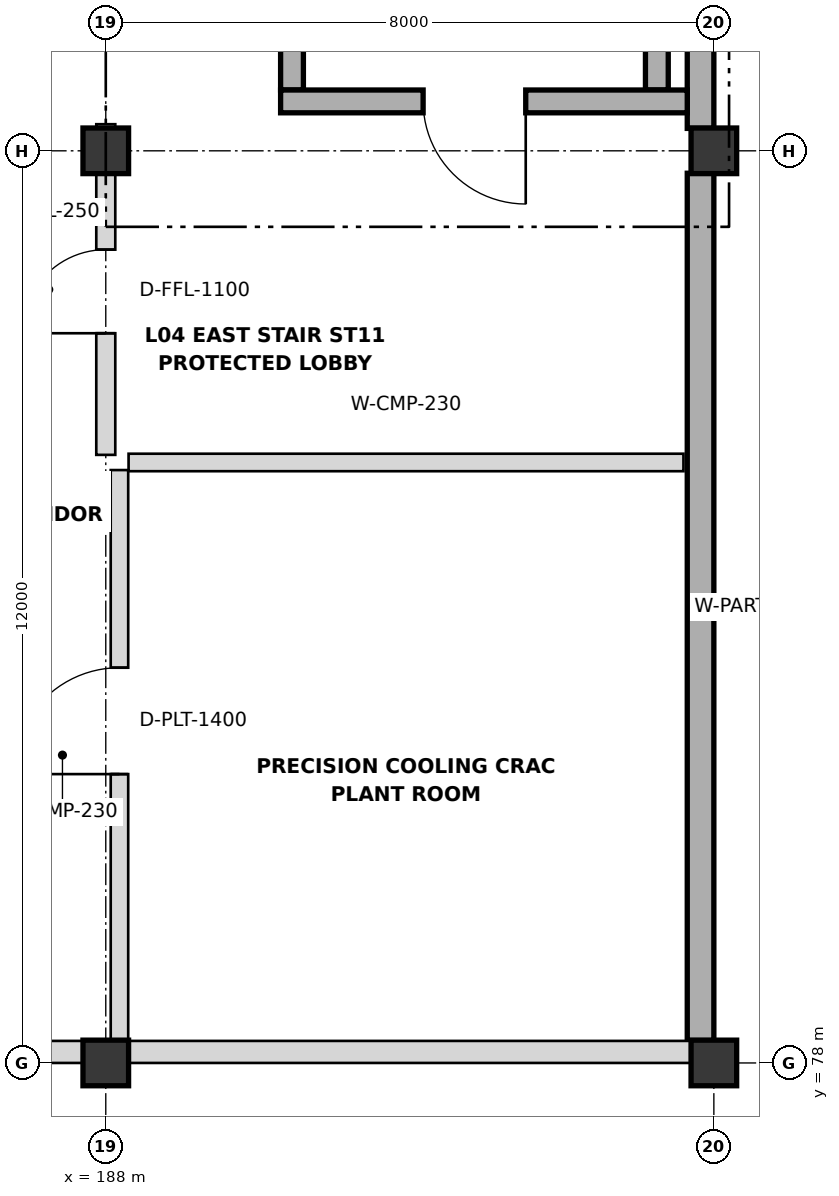
"""IFC4 building model, lengths in metres.
Left out: names, types, materials, properties, quantities, classifications, styles, units other than length and angle.
Written with IfcOpenShell. Run it as: python <this file> out.ifc"""

import sys

from ifc_helpers import new_model, si_unit, direction, frame, frame_2d, origin, origin_2d, place, context, subcontext, project, spatial, rectangle, extrude, element, fill, save


model = new_model("IFC4")
c1 = context("Model", 3, precision=1e-05, world=origin(), true_north=direction((0.0, 1.0)))
c2 = subcontext(c1, "Body", "Model", "MODEL_VIEW")
j1 = project(units=[si_unit("LENGTHUNIT", "METRE"), si_unit("PLANEANGLEUNIT", "RADIAN")], contexts=[c1])
p1 = place(None, origin())
s1 = spatial("IfcSite", under=j1, at=p1, CompositionType="ELEMENT")
p2 = place(p1, origin())
s2 = spatial("IfcBuilding", under=s1, at=p2, CompositionType="ELEMENT")
p3 = place(p2, frame((0.0, 0.0, 18.6)))
s3 = spatial("IfcBuildingStorey", under=s2, at=p3, CompositionType="ELEMENT", Elevation=18.6)
for number, where, z_axis, x_axis in (
    (1, (188.0, 78.0, 0.0), (0.0, 0.0, 1.0), (1.0, 0.0, 0.0)),
    (2, (188.0, 90.0, 0.0), (0.0, 0.0, 1.0), (1.0, 0.0, 0.0)),
    (3, (196.0, 78.0, 0.0), (0.0, 0.0, 1.0), (1.0, 0.0, 0.0)),
    (4, (196.0, 90.0, 0.0), (0.0, 0.0, 1.0), (1.0, 0.0, 0.0)),
):
    element("IfcColumn", number, at=place(p3, frame(where, z_axis=z_axis, x_axis=x_axis)), inside=s3, PredefinedType="COLUMN", context=c2, shape_type="SweptSolid", body=[
        extrude(rectangle(XDim=0.6, YDim=0.6, at=origin_2d()), origin(), (0.0, 0.0, 1.0), 4.2),
    ])
for number, where, z_axis, x_axis in (
    (5, (195.825, 89.705, 0.0), (0.0, 0.0, 1.0), (0.0, -1.0, 0.0)),
    (6, (195.825, 101.705, 0.0), (0.0, 0.0, 1.0), (0.0, -1.0, 0.0)),
):
    element("IfcWall", number, at=place(p3, frame(where, z_axis=z_axis, x_axis=x_axis)), inside=s3, PredefinedType="SOLIDWALL", context=c2, shape_type="SweptSolid", body=[
        extrude(rectangle(XDim=11.41, YDim=0.35, at=frame_2d((5.705, 0.0))), origin(), (0.0, 0.0, 1.0), 4.2),
    ])
p4 = place(p3, frame((187.705, 78.145, 0.0), z_axis=(0.0, 0.0, 1.0), x_axis=(-1.0, 0.0, 0.0)))
e7 = element("IfcWall", 7, at=p4, inside=s3, PredefinedType="SOLIDWALL", context=c2, shape_type="SweptSolid", body=[
    extrude(rectangle(XDim=9.41, YDim=0.29, at=frame_2d((4.705, 0.0))), origin(), (0.0, 0.0, 1.0), 3.188),
])
p5 = place(p4, frame((5.405, 0.0, 1.0)))
e8 = element("IfcOpeningElement", 8, at=p5, cuts=e7, PredefinedType="OPENING", context=c2, shape_type="SweptSolid", body=[
    extrude(rectangle(XDim=2.1, YDim=1.15, at=frame_2d((1.05, 0.575))), frame((0.0, 0.155, 0.0), z_axis=(0.0, -1.0, 0.0), x_axis=(1.0, 0.0, 0.0)), (0.0, 0.0, 1.0), 0.31),
])
p6 = place(p3, frame((195.705, 78.145, 0.0), z_axis=(0.0, 0.0, 1.0), x_axis=(-1.0, 0.0, 0.0)))
e9 = element("IfcWall", 9, at=p6, inside=s3, PredefinedType="SOLIDWALL", context=c2, shape_type="SweptSolid", body=[
    extrude(rectangle(XDim=7.41, YDim=0.29, at=frame_2d((3.705, 0.0))), origin(), (0.0, 0.0, 1.0), 3.188),
])
for number, where, z_axis, x_axis in (
    (10, (190.45, 90.8, 0.0), (0.0, 0.0, 1.0), (0.0, 1.0, 0.0)),
    (11, (195.25, 99.4, 0.0), (0.0, 0.0, 1.0), (0.0, -1.0, 0.0)),
):
    element("IfcWall", number, at=place(p3, frame(where, z_axis=z_axis, x_axis=x_axis)), inside=s3, PredefinedType="SHEAR", context=c2, shape_type="SweptSolid", body=[
        extrude(rectangle(XDim=8.6, YDim=0.3, at=frame_2d((4.3, 0.0))), origin(), (0.0, 0.0, 1.0), 4.2),
    ])
p7 = place(p3, frame((195.65, 90.65, 0.0), z_axis=(0.0, 0.0, 1.0), x_axis=(-1.0, 0.0, 0.0)))
e12 = element("IfcWall", 12, at=p7, inside=s3, PredefinedType="SHEAR", context=c2, shape_type="SweptSolid", body=[
    extrude(rectangle(XDim=5.35, YDim=0.3, at=frame_2d((2.675, 0.0))), origin(), (0.0, 0.0, 1.0), 4.2),
])
p8 = place(p7, frame((2.125, 0.0, 0.0)))
e13 = element("IfcOpeningElement", 13, at=p8, cuts=e12, PredefinedType="OPENING", context=c2, shape_type="SweptSolid", body=[
    extrude(rectangle(XDim=1.35, YDim=2.15, at=frame_2d((0.675, 1.075))), frame((0.0, 0.16, 0.0), z_axis=(0.0, -1.0, 0.0), x_axis=(1.0, 0.0, 0.0)), (0.0, 0.0, 1.0), 0.32),
])
p9 = place(p3, frame((188.0, 86.0, 0.0), z_axis=(0.0, 0.0, 1.0), x_axis=(0.0, 1.0, 0.0)))
e14 = element("IfcWall", 14, at=p9, inside=s3, PredefinedType="PARTITIONING", context=c2, shape_type="SweptSolid", body=[
    extrude(rectangle(XDim=4.35, YDim=0.25, at=frame_2d((2.175, 0.0))), origin(), (0.0, 0.0, 1.0), 3.188),
])
p10 = place(p9, frame((1.6, 0.0, 0.0)))
e15 = element("IfcOpeningElement", 15, at=p10, cuts=e14, PredefinedType="OPENING", context=c2, shape_type="SweptSolid", body=[
    extrude(rectangle(XDim=1.1, YDim=2.15, at=frame_2d((0.55, 1.075))), frame((0.0, 0.135, 0.0), z_axis=(0.0, -1.0, 0.0), x_axis=(1.0, 0.0, 0.0)), (0.0, 0.0, 1.0), 0.27),
])
p11 = place(p3, frame((188.18, 78.3, 0.0), z_axis=(0.0, 0.0, 1.0), x_axis=(0.0, 1.0, 0.0)))
e16 = element("IfcWall", 16, at=p11, inside=s3, PredefinedType="PARTITIONING", context=c2, shape_type="SweptSolid", body=[
    extrude(rectangle(XDim=7.5, YDim=0.23, at=frame_2d((3.75, 0.0))), origin(), (0.0, 0.0, 1.0), 3.188),
])
p12 = place(p11, frame((3.5, 0.0, 0.0)))
e17 = element("IfcOpeningElement", 17, at=p12, cuts=e16, PredefinedType="OPENING", context=c2, shape_type="SweptSolid", body=[
    extrude(rectangle(XDim=1.4, YDim=2.2, at=frame_2d((0.7, 1.1))), frame((0.0, 0.125, 0.0), z_axis=(0.0, -1.0, 0.0), x_axis=(1.0, 0.0, 0.0)), (0.0, 0.0, 1.0), 0.25),
])
p13 = place(p3, frame((188.3, 85.9, 0.0), z_axis=(0.0, 0.0, 1.0), x_axis=(1.0, 0.0, 0.0)))
e18 = element("IfcWall", 18, at=p13, inside=s3, PredefinedType="PARTITIONING", context=c2, shape_type="SweptSolid", body=[
    extrude(rectangle(XDim=7.3, YDim=0.23, at=frame_2d((3.65, 0.0))), origin(), (0.0, 0.0, 1.0), 3.188),
])
p14 = place(p8, origin())
e19 = element("IfcDoor", 19, at=p14, inside=s3, OperationType="SINGLE_SWING_LEFT", PredefinedType="DOOR", context=c2, shape_type="SweptSolid", body=[
    extrude(rectangle(XDim=1.35, YDim=2.15, at=frame_2d((0.675, 1.075))), frame((0.0, 0.025, 0.0), z_axis=(0.0, -1.0, 0.0), x_axis=(1.0, 0.0, 0.0)), (0.0, 0.0, 1.0), 0.05),
])
fill(e13, e19)
p15 = place(p10, origin())
e20 = element("IfcDoor", 20, at=p15, inside=s3, OperationType="SINGLE_SWING_LEFT", PredefinedType="DOOR", context=c2, shape_type="SweptSolid", body=[
    extrude(rectangle(XDim=1.1, YDim=2.15, at=frame_2d((0.55, 1.075))), frame((0.0, 0.025, 0.0), z_axis=(0.0, -1.0, 0.0), x_axis=(1.0, 0.0, 0.0)), (0.0, 0.0, 1.0), 0.05),
])
fill(e15, e20)
p16 = place(p12, origin())
e21 = element("IfcDoor", 21, at=p16, inside=s3, OperationType="SINGLE_SWING_LEFT", PredefinedType="DOOR", context=c2, shape_type="SweptSolid", body=[
    extrude(rectangle(XDim=1.4, YDim=2.2, at=frame_2d((0.7, 1.1))), frame((0.0, 0.025, 0.0), z_axis=(0.0, -1.0, 0.0), x_axis=(1.0, 0.0, 0.0)), (0.0, 0.0, 1.0), 0.05),
])
fill(e17, e21)
save(model, sys.argv[1])
